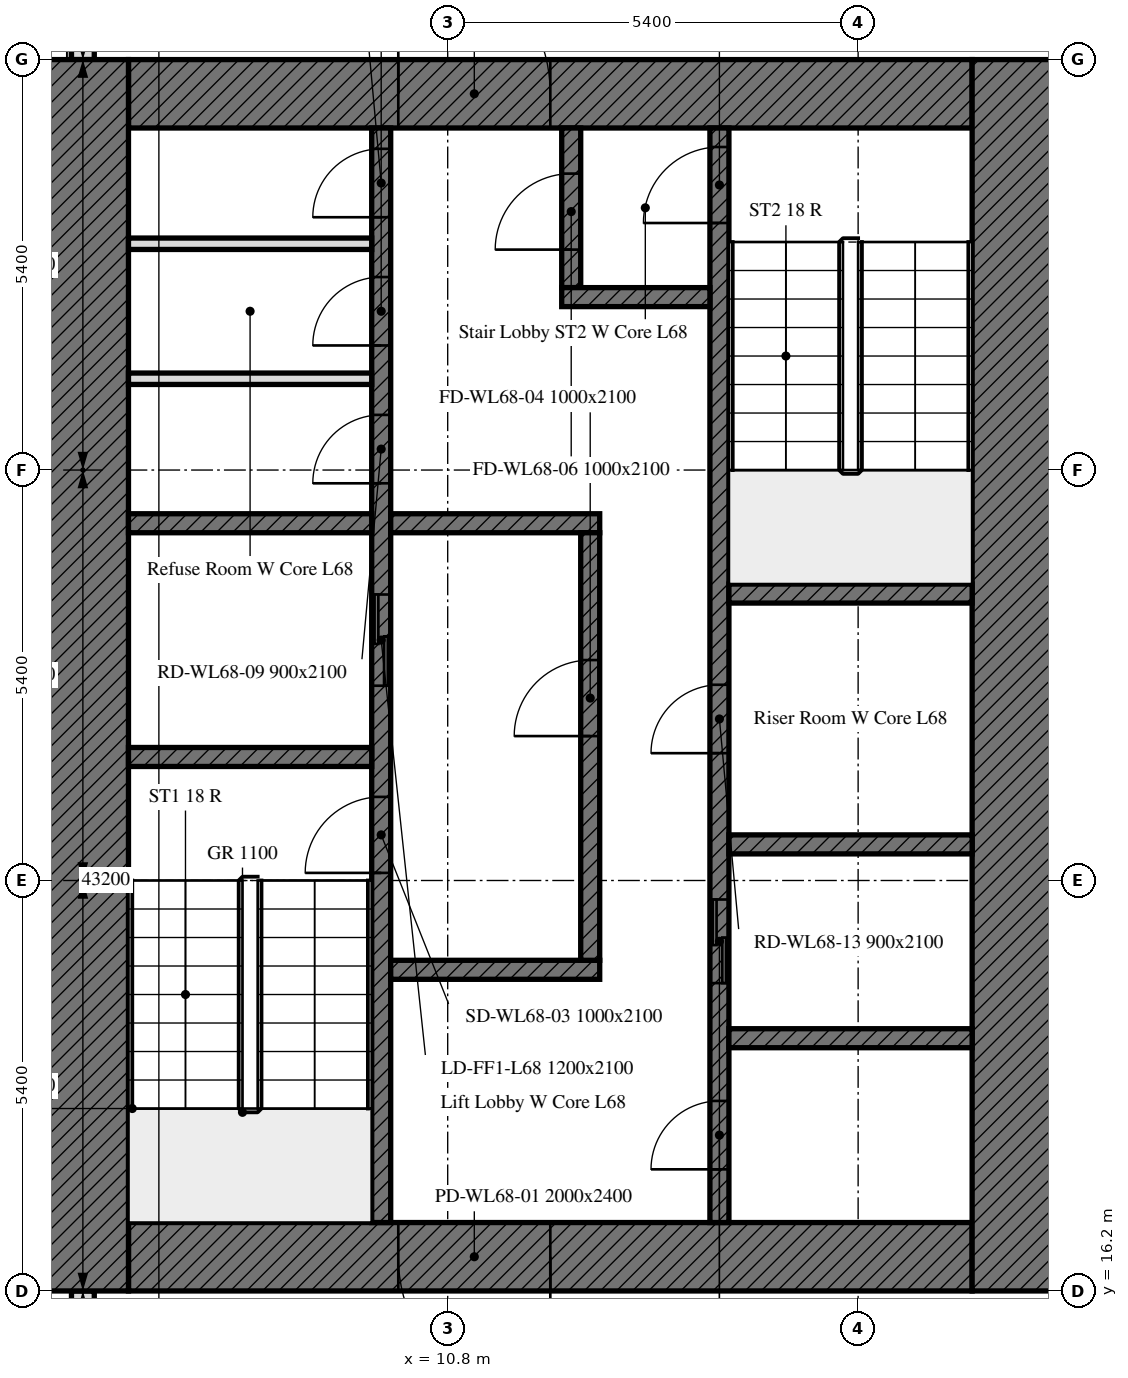
"""IFC4 building model, lengths in metres.
Left out: names, types, materials, properties, quantities, classifications, styles, units other than length and angle.
Written with IfcOpenShell. Run it as: python <this file> out.ifc"""

import sys

from ifc_helpers import new_model, si_unit, direction, frame, frame_2d, origin, place, context, subcontext, project, spatial, rectangle, extrude, element, fill, save


model = new_model("IFC4")
c1 = context("Model", 3, precision=1e-05, world=origin(), true_north=direction((0.0, 1.0)))
c2 = subcontext(c1, "Body", "Model", "MODEL_VIEW")
j1 = project(units=[si_unit("LENGTHUNIT", "METRE"), si_unit("PLANEANGLEUNIT", "RADIAN")], contexts=[c1])
p1 = place(None, origin())
s1 = spatial("IfcSite", under=j1, at=p1, CompositionType="ELEMENT")
p2 = place(p1, origin())
s2 = spatial("IfcBuilding", under=s1, at=p2, CompositionType="ELEMENT")
p3 = place(p2, frame((0.0, 0.0, 278.5)))
s3 = spatial("IfcBuildingStorey", under=s2, at=p3, CompositionType="ELEMENT", Elevation=278.5)
p4 = place(p3, frame((6.0, 37.614, 0.0), z_axis=(0.0, 0.0, 1.0), x_axis=(0.0, -1.0, 0.0)))
e1 = element("IfcWall", 1, at=p4, inside=s3, PredefinedType="SOLIDWALL", context=c2, shape_type="SweptSolid", body=[
    extrude(rectangle(XDim=5.214, YDim=0.3, at=frame_2d((2.607, 0.0))), origin(), (0.0, 0.0, 1.0), 3.0),
])
p5 = place(p4, frame((1.164, 0.0, 0.9)))
e2 = element("IfcOpeningElement", 2, at=p5, cuts=e1, PredefinedType="OPENING", context=c2, shape_type="SweptSolid", body=[
    extrude(rectangle(XDim=1.1, YDim=1.7, at=frame_2d((0.55, 0.85))), frame((0.0, 0.16, 0.0), z_axis=(0.0, -1.0, 0.0), x_axis=(1.0, 0.0, 0.0)), (0.0, 0.0, 1.0), 0.32),
])
p6 = place(p4, frame((2.589, 0.0, 0.9)))
e3 = element("IfcOpeningElement", 3, at=p6, cuts=e1, PredefinedType="OPENING", context=c2, shape_type="SweptSolid", body=[
    extrude(rectangle(XDim=0.65, YDim=1.7, at=frame_2d((0.325, 0.85))), frame((0.0, 0.16, 0.0), z_axis=(0.0, -1.0, 0.0), x_axis=(1.0, 0.0, 0.0)), (0.0, 0.0, 1.0), 0.32),
])
p7 = place(p3, frame((6.0, 16.2, 0.0), z_axis=(0.0, 0.0, 1.0), x_axis=(0.0, -1.0, 0.0)))
e4 = element("IfcWall", 4, at=p7, inside=s3, PredefinedType="SOLIDWALL", context=c2, shape_type="SweptSolid", body=[
    extrude(rectangle(XDim=10.614, YDim=0.3, at=frame_2d((5.307, 0.0))), origin(), (0.0, 0.0, 1.0), 3.0),
])
p8 = place(p7, frame((1.975, 0.0, 0.9)))
e5 = element("IfcOpeningElement", 5, at=p8, cuts=e4, PredefinedType="OPENING", context=c2, shape_type="SweptSolid", body=[
    extrude(rectangle(XDim=0.65, YDim=1.7, at=frame_2d((0.325, 0.85))), frame((0.0, 0.16, 0.0), z_axis=(0.0, -1.0, 0.0), x_axis=(1.0, 0.0, 0.0)), (0.0, 0.0, 1.0), 0.32),
])
p9 = place(p7, frame((2.95, 0.0, 0.9)))
e6 = element("IfcOpeningElement", 6, at=p9, cuts=e4, PredefinedType="OPENING", context=c2, shape_type="SweptSolid", body=[
    extrude(rectangle(XDim=1.1, YDim=1.7, at=frame_2d((0.55, 0.85))), frame((0.0, 0.16, 0.0), z_axis=(0.0, -1.0, 0.0), x_axis=(1.0, 0.0, 0.0)), (0.0, 0.0, 1.0), 0.32),
])
p10 = place(p7, frame((6.75, 0.0, 0.9)))
e7 = element("IfcOpeningElement", 7, at=p10, cuts=e4, PredefinedType="OPENING", context=c2, shape_type="SweptSolid", body=[
    extrude(rectangle(XDim=1.1, YDim=1.7, at=frame_2d((0.55, 0.85))), frame((0.0, 0.16, 0.0), z_axis=(0.0, -1.0, 0.0), x_axis=(1.0, 0.0, 0.0)), (0.0, 0.0, 1.0), 0.32),
])
p11 = place(p7, frame((8.175, 0.0, 0.9)))
e8 = element("IfcOpeningElement", 8, at=p11, cuts=e4, PredefinedType="OPENING", context=c2, shape_type="SweptSolid", body=[
    extrude(rectangle(XDim=0.65, YDim=1.7, at=frame_2d((0.325, 0.85))), frame((0.0, 0.16, 0.0), z_axis=(0.0, -1.0, 0.0), x_axis=(1.0, 0.0, 0.0)), (0.0, 0.0, 1.0), 0.32),
])
p12 = place(p3, frame((17.7, 16.65, 0.0), z_axis=(0.0, 0.0, 1.0), x_axis=(-1.0, 0.0, 0.0)))
e9 = element("IfcWall", 9, at=p12, inside=s3, PredefinedType="SOLIDWALL", context=c2, shape_type="SweptSolid", body=[
    extrude(rectangle(XDim=11.1, YDim=0.9, at=frame_2d((5.55, 0.0))), origin(), (0.0, 0.0, 1.0), 3.0),
])
p13 = place(p12, frame((5.55, 0.0, 0.0)))
e10 = element("IfcOpeningElement", 10, at=p13, cuts=e9, PredefinedType="OPENING", context=c2, shape_type="SweptSolid", body=[
    extrude(rectangle(XDim=2.0, YDim=2.4, at=frame_2d((1.0, 1.2))), frame((0.0, 0.45, 0.0), z_axis=(0.0, -1.0, 0.0), x_axis=(1.0, 0.0, 0.0)), (0.0, 0.0, 1.0), 0.9),
])
p14 = place(p3, frame((6.6, 31.95, 0.0), z_axis=(0.0, 0.0, 1.0), x_axis=(1.0, 0.0, 0.0)))
e11 = element("IfcWall", 11, at=p14, inside=s3, PredefinedType="SOLIDWALL", context=c2, shape_type="SweptSolid", body=[
    extrude(rectangle(XDim=11.1, YDim=0.9, at=frame_2d((5.55, 0.0))), origin(), (0.0, 0.0, 1.0), 3.0),
])
p15 = place(p14, frame((3.55, 0.0, 0.0)))
e12 = element("IfcOpeningElement", 12, at=p15, cuts=e11, PredefinedType="OPENING", context=c2, shape_type="SweptSolid", body=[
    extrude(rectangle(XDim=2.0, YDim=2.4, at=frame_2d((1.0, 1.2))), frame((0.0, 0.45, 0.0), z_axis=(0.0, -1.0, 0.0), x_axis=(1.0, 0.0, 0.0)), (0.0, 0.0, 1.0), 0.9),
])
for number, where, z_axis, x_axis in (
    (13, (6.0, 16.2, 0.0), (0.0, 0.0, 1.0), (0.0, 1.0, 0.0)),
    (14, (18.3, 32.4, 0.0), (0.0, 0.0, 1.0), (0.0, -1.0, 0.0)),
):
    element("IfcWall", number, at=place(p3, frame(where, z_axis=z_axis, x_axis=x_axis)), inside=s3, PredefinedType="SOLIDWALL", context=c2, shape_type="SweptSolid", body=[
        extrude(rectangle(XDim=16.2, YDim=1.2, at=frame_2d((8.1, 0.0))), origin(), (0.0, 0.0, 1.0), 3.0),
    ])
p16 = place(p3, frame((9.925, 17.1, 0.0), z_axis=(0.0, 0.0, 1.0), x_axis=(0.0, 1.0, 0.0)))
e15 = element("IfcWall", 15, at=p16, inside=s3, PredefinedType="SOLIDWALL", context=c2, shape_type="SweptSolid", body=[
    extrude(rectangle(XDim=14.4, YDim=0.25, at=frame_2d((7.2, 0.0))), origin(), (0.0, 0.0, 1.0), 3.0),
])
p17 = place(p16, frame((4.6, 0.0, 0.0)))
e16 = element("IfcOpeningElement", 16, at=p17, cuts=e15, PredefinedType="OPENING", context=c2, shape_type="SweptSolid", body=[
    extrude(rectangle(XDim=1.0, YDim=2.1, at=frame_2d((0.5, 1.05))), frame((0.0, 0.125, 0.0), z_axis=(0.0, -1.0, 0.0), x_axis=(1.0, 0.0, 0.0)), (0.0, 0.0, 1.0), 0.25),
])
p18 = place(p16, frame((7.062, 0.0, 0.0)))
e17 = element("IfcOpeningElement", 17, at=p18, cuts=e15, PredefinedType="OPENING", context=c2, shape_type="SweptSolid", body=[
    extrude(rectangle(XDim=1.2, YDim=2.1, at=frame_2d((0.6, 1.05))), frame((0.0, 0.125, 0.0), z_axis=(0.0, -1.0, 0.0), x_axis=(1.0, 0.0, 0.0)), (0.0, 0.0, 1.0), 0.25),
])
p19 = place(p16, frame((9.726, 0.0, 0.0)))
e18 = element("IfcOpeningElement", 18, at=p19, cuts=e15, PredefinedType="OPENING", context=c2, shape_type="SweptSolid", body=[
    extrude(rectangle(XDim=0.9, YDim=2.1, at=frame_2d((0.45, 1.05))), frame((0.0, 0.125, 0.0), z_axis=(0.0, -1.0, 0.0), x_axis=(1.0, 0.0, 0.0)), (0.0, 0.0, 1.0), 0.25),
])
p20 = place(p16, frame((11.539, 0.0, 0.0)))
e19 = element("IfcOpeningElement", 19, at=p20, cuts=e15, PredefinedType="OPENING", context=c2, shape_type="SweptSolid", body=[
    extrude(rectangle(XDim=0.9, YDim=2.1, at=frame_2d((0.45, 1.05))), frame((0.0, 0.125, 0.0), z_axis=(0.0, -1.0, 0.0), x_axis=(1.0, 0.0, 0.0)), (0.0, 0.0, 1.0), 0.25),
])
p21 = place(p16, frame((13.226, 0.0, 0.0)))
e20 = element("IfcOpeningElement", 20, at=p21, cuts=e15, PredefinedType="OPENING", context=c2, shape_type="SweptSolid", body=[
    extrude(rectangle(XDim=0.9, YDim=2.1, at=frame_2d((0.45, 1.05))), frame((0.0, 0.125, 0.0), z_axis=(0.0, -1.0, 0.0), x_axis=(1.0, 0.0, 0.0)), (0.0, 0.0, 1.0), 0.25),
])
p22 = place(p3, frame((14.375, 17.1, 0.0), z_axis=(0.0, 0.0, 1.0), x_axis=(0.0, 1.0, 0.0)))
e21 = element("IfcWall", 21, at=p22, inside=s3, PredefinedType="SOLIDWALL", context=c2, shape_type="SweptSolid", body=[
    extrude(rectangle(XDim=14.4, YDim=0.25, at=frame_2d((7.2, 0.0))), origin(), (0.0, 0.0, 1.0), 3.0),
])
p23 = place(p22, frame((13.15, 0.0, 0.0)))
e22 = element("IfcOpeningElement", 22, at=p23, cuts=e21, PredefinedType="OPENING", context=c2, shape_type="SweptSolid", body=[
    extrude(rectangle(XDim=1.0, YDim=2.1, at=frame_2d((0.5, 1.05))), frame((0.0, 0.125, 0.0), z_axis=(0.0, -1.0, 0.0), x_axis=(1.0, 0.0, 0.0)), (0.0, 0.0, 1.0), 0.25),
])
p24 = place(p22, frame((3.15, 0.0, 0.0)))
e23 = element("IfcOpeningElement", 23, at=p24, cuts=e21, PredefinedType="OPENING", context=c2, shape_type="SweptSolid", body=[
    extrude(rectangle(XDim=1.1, YDim=2.1, at=frame_2d((0.55, 1.05))), frame((0.0, 0.125, 0.0), z_axis=(0.0, -1.0, 0.0), x_axis=(1.0, 0.0, 0.0)), (0.0, 0.0, 1.0), 0.25),
])
p25 = place(p22, frame((0.7, 0.0, 0.0)))
e24 = element("IfcOpeningElement", 24, at=p25, cuts=e21, PredefinedType="OPENING", context=c2, shape_type="SweptSolid", body=[
    extrude(rectangle(XDim=0.9, YDim=2.1, at=frame_2d((0.45, 1.05))), frame((0.0, 0.125, 0.0), z_axis=(0.0, -1.0, 0.0), x_axis=(1.0, 0.0, 0.0)), (0.0, 0.0, 1.0), 0.25),
])
p26 = place(p22, frame((6.175, 0.0, 0.0)))
e25 = element("IfcOpeningElement", 25, at=p26, cuts=e21, PredefinedType="OPENING", context=c2, shape_type="SweptSolid", body=[
    extrude(rectangle(XDim=0.9, YDim=2.1, at=frame_2d((0.45, 1.05))), frame((0.0, 0.125, 0.0), z_axis=(0.0, -1.0, 0.0), x_axis=(1.0, 0.0, 0.0)), (0.0, 0.0, 1.0), 0.25),
])
for number, where, z_axis, x_axis in (
    (26, (6.6, 23.225, 0.0), (0.0, 0.0, 1.0), (1.0, 0.0, 0.0)),
    (27, (14.5, 25.375, 0.0), (0.0, 0.0, 1.0), (1.0, 0.0, 0.0)),
    (28, (14.5, 22.075, 0.0), (0.0, 0.0, 1.0), (1.0, 0.0, 0.0)),
    (29, (6.6, 26.3, 0.0), (0.0, 0.0, 1.0), (1.0, 0.0, 0.0)),
):
    element("IfcWall", number, at=place(p3, frame(where, z_axis=z_axis, x_axis=x_axis)), inside=s3, PredefinedType="SOLIDWALL", context=c2, shape_type="SweptSolid", body=[
        extrude(rectangle(XDim=3.2, YDim=0.25, at=frame_2d((1.6, 0.0))), origin(), (0.0, 0.0, 1.0), 3.0),
    ])
for number, where, z_axis, x_axis in (
    (30, (10.05, 26.3, 0.0), (0.0, 0.0, 1.0), (1.0, 0.0, 0.0)),
    (31, (10.05, 20.425, 0.0), (0.0, 0.0, 1.0), (1.0, 0.0, 0.0)),
):
    element("IfcWall", number, at=place(p3, frame(where, z_axis=z_axis, x_axis=x_axis)), inside=s3, PredefinedType="SOLIDWALL", context=c2, shape_type="SweptSolid", body=[
        extrude(rectangle(XDim=2.75, YDim=0.25, at=frame_2d((1.375, 0.0))), origin(), (0.0, 0.0, 1.0), 3.0),
    ])
p27 = place(p3, frame((12.425, 29.4, 0.0), z_axis=(0.0, 0.0, 1.0), x_axis=(0.0, 1.0, 0.0)))
e32 = element("IfcWall", 32, at=p27, inside=s3, PredefinedType="SOLIDWALL", context=c2, shape_type="SweptSolid", body=[
    extrude(rectangle(XDim=2.1, YDim=0.25, at=frame_2d((1.05, 0.0))), origin(), (0.0, 0.0, 1.0), 3.0),
])
p28 = place(p27, frame((0.5, 0.0, 0.0)))
e33 = element("IfcOpeningElement", 33, at=p28, cuts=e32, PredefinedType="OPENING", context=c2, shape_type="SweptSolid", body=[
    extrude(rectangle(XDim=1.0, YDim=2.1, at=frame_2d((0.5, 1.05))), frame((0.0, 0.125, 0.0), z_axis=(0.0, -1.0, 0.0), x_axis=(1.0, 0.0, 0.0)), (0.0, 0.0, 1.0), 0.25),
])
p29 = place(p3, frame((12.3, 29.275, 0.0), z_axis=(0.0, 0.0, 1.0), x_axis=(1.0, 0.0, 0.0)))
e34 = element("IfcWall", 34, at=p29, inside=s3, PredefinedType="SOLIDWALL", context=c2, shape_type="SweptSolid", body=[
    extrude(rectangle(XDim=1.95, YDim=0.25, at=frame_2d((0.975, 0.0))), origin(), (0.0, 0.0, 1.0), 3.0),
])
p30 = place(p3, frame((12.675, 20.55, 0.0), z_axis=(0.0, 0.0, 1.0), x_axis=(0.0, 1.0, 0.0)))
e35 = element("IfcWall", 35, at=p30, inside=s3, PredefinedType="SOLIDWALL", context=c2, shape_type="SweptSolid", body=[
    extrude(rectangle(XDim=5.625, YDim=0.25, at=frame_2d((2.812, 0.0))), origin(), (0.0, 0.0, 1.0), 3.0),
])
p31 = place(p30, frame((2.95, 0.0, 0.0)))
e36 = element("IfcOpeningElement", 36, at=p31, cuts=e35, PredefinedType="OPENING", context=c2, shape_type="SweptSolid", body=[
    extrude(rectangle(XDim=1.0, YDim=2.1, at=frame_2d((0.5, 1.05))), frame((0.0, 0.125, 0.0), z_axis=(0.0, -1.0, 0.0), x_axis=(1.0, 0.0, 0.0)), (0.0, 0.0, 1.0), 0.25),
])
p32 = place(p3, frame((14.5, 19.525, 0.0), z_axis=(0.0, 0.0, 1.0), x_axis=(1.0, 0.0, 0.0)))
e37 = element("IfcWall", 37, at=p32, inside=s3, PredefinedType="SOLIDWALL", context=c2, shape_type="SweptSolid", body=[
    extrude(rectangle(XDim=3.2, YDim=0.25, at=frame_2d((1.6, 0.0))), origin(), (0.0, 0.0, 1.0), 3.0),
])
for number, where, z_axis, x_axis in (
    (38, (6.6, 28.201, 0.0), (0.0, 0.0, 1.0), (1.0, 0.0, 0.0)),
    (39, (6.6, 29.977, 0.0), (0.0, 0.0, 1.0), (1.0, 0.0, 0.0)),
):
    element("IfcWall", number, at=place(p3, frame(where, z_axis=z_axis, x_axis=x_axis)), inside=s3, PredefinedType="PARTITIONING", context=c2, shape_type="SweptSolid", body=[
        extrude(rectangle(XDim=3.2, YDim=0.15, at=frame_2d((1.6, 0.0))), origin(), (0.0, 0.0, 1.0), 3.0),
    ])
p33 = place(p13, origin())
e40 = element("IfcDoor", 40, at=p33, inside=s3, OperationType="DOUBLE_DOOR_SINGLE_SWING", PredefinedType="DOOR", context=c2, shape_type="SweptSolid", body=[
    extrude(rectangle(XDim=2.0, YDim=2.4, at=frame_2d((1.0, 1.2))), frame((0.0, 0.025, 0.0), z_axis=(0.0, -1.0, 0.0), x_axis=(1.0, 0.0, 0.0)), (0.0, 0.0, 1.0), 0.05),
])
fill(e10, e40)
p34 = place(p15, origin())
e41 = element("IfcDoor", 41, at=p34, inside=s3, OperationType="DOUBLE_DOOR_SINGLE_SWING", PredefinedType="DOOR", context=c2, shape_type="SweptSolid", body=[
    extrude(rectangle(XDim=2.0, YDim=2.4, at=frame_2d((1.0, 1.2))), frame((0.0, 0.025, 0.0), z_axis=(0.0, -1.0, 0.0), x_axis=(1.0, 0.0, 0.0)), (0.0, 0.0, 1.0), 0.05),
])
fill(e12, e41)
p35 = place(p17, origin())
e42 = element("IfcDoor", 42, at=p35, inside=s3, OperationType="SINGLE_SWING_LEFT", PredefinedType="DOOR", context=c2, shape_type="SweptSolid", body=[
    extrude(rectangle(XDim=1.0, YDim=2.1, at=frame_2d((0.5, 1.05))), frame((0.0, 0.025, 0.0), z_axis=(0.0, -1.0, 0.0), x_axis=(1.0, 0.0, 0.0)), (0.0, 0.0, 1.0), 0.05),
])
fill(e16, e42)
p36 = place(p31, origin())
e43 = element("IfcDoor", 43, at=p36, inside=s3, OperationType="SINGLE_SWING_LEFT", PredefinedType="DOOR", context=c2, shape_type="SweptSolid", body=[
    extrude(rectangle(XDim=1.0, YDim=2.1, at=frame_2d((0.5, 1.05))), frame((0.0, 0.025, 0.0), z_axis=(0.0, -1.0, 0.0), x_axis=(1.0, 0.0, 0.0)), (0.0, 0.0, 1.0), 0.05),
])
fill(e36, e43)
p37 = place(p23, origin())
e44 = element("IfcDoor", 44, at=p37, inside=s3, OperationType="SINGLE_SWING_LEFT", PredefinedType="DOOR", context=c2, shape_type="SweptSolid", body=[
    extrude(rectangle(XDim=1.0, YDim=2.1, at=frame_2d((0.5, 1.05))), frame((0.0, 0.025, 0.0), z_axis=(0.0, -1.0, 0.0), x_axis=(1.0, 0.0, 0.0)), (0.0, 0.0, 1.0), 0.05),
])
fill(e22, e44)
p38 = place(p28, origin())
e45 = element("IfcDoor", 45, at=p38, inside=s3, OperationType="SINGLE_SWING_LEFT", PredefinedType="DOOR", context=c2, shape_type="SweptSolid", body=[
    extrude(rectangle(XDim=1.0, YDim=2.1, at=frame_2d((0.5, 1.05))), frame((0.0, 0.025, 0.0), z_axis=(0.0, -1.0, 0.0), x_axis=(1.0, 0.0, 0.0)), (0.0, 0.0, 1.0), 0.05),
])
fill(e33, e45)
p39 = place(p18, origin())
e46 = element("IfcDoor", 46, at=p39, inside=s3, OperationType="DOUBLE_DOOR_SLIDING", PredefinedType="DOOR", context=c2, shape_type="SweptSolid", body=[
    extrude(rectangle(XDim=1.2, YDim=2.1, at=frame_2d((0.6, 1.05))), frame((0.0, 0.025, 0.0), z_axis=(0.0, -1.0, 0.0), x_axis=(1.0, 0.0, 0.0)), (0.0, 0.0, 1.0), 0.05),
])
fill(e17, e46)
p40 = place(p24, origin())
e47 = element("IfcDoor", 47, at=p40, inside=s3, OperationType="DOUBLE_DOOR_SLIDING", PredefinedType="DOOR", context=c2, shape_type="SweptSolid", body=[
    extrude(rectangle(XDim=1.1, YDim=2.1, at=frame_2d((0.55, 1.05))), frame((0.0, 0.025, 0.0), z_axis=(0.0, -1.0, 0.0), x_axis=(1.0, 0.0, 0.0)), (0.0, 0.0, 1.0), 0.05),
])
fill(e23, e47)
p41 = place(p19, origin())
e48 = element("IfcDoor", 48, at=p41, inside=s3, OperationType="SINGLE_SWING_LEFT", PredefinedType="DOOR", context=c2, shape_type="SweptSolid", body=[
    extrude(rectangle(XDim=0.9, YDim=2.1, at=frame_2d((0.45, 1.05))), frame((0.0, 0.025, 0.0), z_axis=(0.0, -1.0, 0.0), x_axis=(1.0, 0.0, 0.0)), (0.0, 0.0, 1.0), 0.05),
])
fill(e18, e48)
p42 = place(p20, origin())
e49 = element("IfcDoor", 49, at=p42, inside=s3, OperationType="SINGLE_SWING_LEFT", PredefinedType="DOOR", context=c2, shape_type="SweptSolid", body=[
    extrude(rectangle(XDim=0.9, YDim=2.1, at=frame_2d((0.45, 1.05))), frame((0.0, 0.025, 0.0), z_axis=(0.0, -1.0, 0.0), x_axis=(1.0, 0.0, 0.0)), (0.0, 0.0, 1.0), 0.05),
])
fill(e19, e49)
p43 = place(p21, origin())
e50 = element("IfcDoor", 50, at=p43, inside=s3, OperationType="SINGLE_SWING_LEFT", PredefinedType="DOOR", context=c2, shape_type="SweptSolid", body=[
    extrude(rectangle(XDim=0.9, YDim=2.1, at=frame_2d((0.45, 1.05))), frame((0.0, 0.025, 0.0), z_axis=(0.0, -1.0, 0.0), x_axis=(1.0, 0.0, 0.0)), (0.0, 0.0, 1.0), 0.05),
])
fill(e20, e50)
p44 = place(p25, origin())
e51 = element("IfcDoor", 51, at=p44, inside=s3, OperationType="SINGLE_SWING_LEFT", PredefinedType="DOOR", context=c2, shape_type="SweptSolid", body=[
    extrude(rectangle(XDim=0.9, YDim=2.1, at=frame_2d((0.45, 1.05))), frame((0.0, 0.025, 0.0), z_axis=(0.0, -1.0, 0.0), x_axis=(1.0, 0.0, 0.0)), (0.0, 0.0, 1.0), 0.05),
])
fill(e24, e51)
p45 = place(p26, origin())
e52 = element("IfcDoor", 52, at=p45, inside=s3, OperationType="SINGLE_SWING_LEFT", PredefinedType="DOOR", context=c2, shape_type="SweptSolid", body=[
    extrude(rectangle(XDim=0.9, YDim=2.1, at=frame_2d((0.45, 1.05))), frame((0.0, 0.025, 0.0), z_axis=(0.0, -1.0, 0.0), x_axis=(1.0, 0.0, 0.0)), (0.0, 0.0, 1.0), 0.05),
])
fill(e25, e52)
save(model, sys.argv[1])
